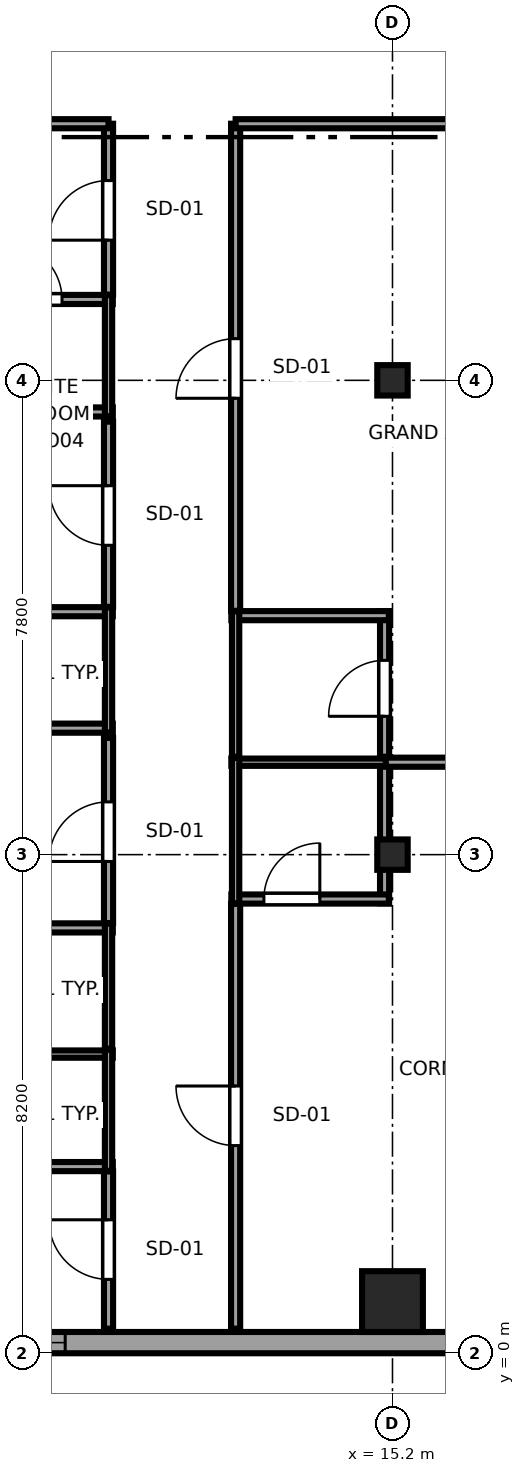
"""IFC4 building model, lengths in metres.
Left out: names, types, materials, properties, quantities, classifications, styles, units other than length and angle.
Written with IfcOpenShell. Run it as: python <this file> out.ifc"""

import sys

from ifc_helpers import new_model, si_unit, direction, frame, frame_2d, origin, origin_2d, place, context, subcontext, project, spatial, rectangle, i_section, extrude, source, transform, mapped, element, fill, save


model = new_model("IFC4")
c1 = context("Model", 3, precision=1e-05, world=origin(), true_north=direction((0.0, 1.0)))
c2 = subcontext(c1, "Body", "Model", "MODEL_VIEW")
j1 = project(units=[si_unit("LENGTHUNIT", "METRE"), si_unit("PLANEANGLEUNIT", "RADIAN")], contexts=[c1])
p1 = place(None, origin())
s1 = spatial("IfcSite", under=j1, at=p1, CompositionType="ELEMENT")
p2 = place(p1, origin())
s2 = spatial("IfcBuilding", under=s1, at=p2, CompositionType="ELEMENT")
p3 = place(p2, frame((0.0, 0.0, 63.95)))
s3 = spatial("IfcBuildingStorey", under=s2, at=p3, CompositionType="ELEMENT", Elevation=63.95)
m1 = source(origin(), c2, "Body", "SweptSolid", [
    extrude(rectangle(XDim=1.0, YDim=1.0, at=origin_2d()), origin(), (0.0, 0.0, 1.0), 3.55),
])
p4 = place(p3, frame((15.2, 0.85, 0.0), z_axis=(0.0, 0.0, 1.0), x_axis=(1.0, 0.0, 0.0)))
e1 = element("IfcColumn", 1, at=p4, inside=s3, PredefinedType="COLUMN", context=c2, shape_type="MappedRepresentation", body=[
    mapped(m1, transform((0.0, 0.0, 0.0), x_axis=(1.0, 0.0, 0.0), y_axis=(0.0, 1.0, 0.0), z_axis=(0.0, 0.0, 1.0), scale=1.0)),
])
m2 = source(origin(), c2, "Body", "SweptSolid", [
    extrude(i_section(OverallWidth=0.5, OverallDepth=0.5, WebThickness=0.028, FlangeThickness=0.045, at=origin_2d()), origin(), (0.0, 0.0, 1.0), 3.55),
])
for number, where, z_axis, x_axis in (
    (2, (15.2, 8.2, 0.0), (0.0, 0.0, 1.0), (1.0, 0.0, 0.0)),
    (3, (15.2, 16.0, 0.0), (0.0, 0.0, 1.0), (1.0, 0.0, 0.0)),
):
    element("IfcColumn", number, at=place(p3, frame(where, z_axis=z_axis, x_axis=x_axis)), inside=s3, PredefinedType="COLUMN", context=c2, shape_type="MappedRepresentation", body=[
        mapped(m2, transform((0.0, 0.0, 0.0), x_axis=(1.0, 0.0, 0.0), y_axis=(0.0, 1.0, 0.0), z_axis=(0.0, 0.0, 1.0), scale=1.0)),
    ])
p5 = place(p3, frame((4.617, 0.175, 0.0), z_axis=(0.0, 0.0, 1.0), x_axis=(1.0, 0.0, 0.0)))
e4 = element("IfcWall", 4, at=p5, inside=s3, PredefinedType="SOLIDWALL", context=c2, shape_type="SweptSolid", body=[
    extrude(rectangle(XDim=18.008, YDim=0.35, at=frame_2d((9.004, 0.0))), origin(), (0.0, 0.0, 1.0), 3.37),
])
p6 = place(p5, frame((14.257, 0.0, 0.68)))
e5 = element("IfcOpeningElement", 5, at=p6, cuts=e4, PredefinedType="OPENING", context=c2, shape_type="SweptSolid", body=[
    extrude(rectangle(XDim=2.1, YDim=1.9, at=frame_2d((1.05, 0.95))), frame((0.0, 0.185, 0.0), z_axis=(0.0, -1.0, 0.0), x_axis=(1.0, 0.0, 0.0)), (0.0, 0.0, 1.0), 0.37),
])
p7 = place(p5, frame((3.7, 0.0, 0.62)))
e6 = element("IfcOpeningElement", 6, at=p7, cuts=e4, PredefinedType="OPENING", context=c2, shape_type="SweptSolid", body=[
    extrude(rectangle(XDim=1.5, YDim=1.55, at=frame_2d((0.75, 0.775))), frame((0.0, 0.185, 0.0), z_axis=(0.0, -1.0, 0.0), x_axis=(1.0, 0.0, 0.0)), (0.0, 0.0, 1.0), 0.37),
])
p8 = place(p3, frame((8.01, 3.07, 0.0), z_axis=(0.0, 0.0, 1.0), x_axis=(1.0, 0.0, 0.0)))
e7 = element("IfcWall", 7, at=p8, inside=s3, PredefinedType="PARTITIONING", context=c2, shape_type="SweptSolid", body=[
    extrude(rectangle(XDim=2.59, YDim=0.15, at=frame_2d((1.295, 0.0))), origin(), (0.0, 0.0, 1.0), 3.37),
])
p9 = place(p3, frame((8.01, 4.92, 0.0), z_axis=(0.0, 0.0, 1.0), x_axis=(1.0, 0.0, 0.0)))
e8 = element("IfcWall", 8, at=p9, inside=s3, PredefinedType="PLUMBINGWALL", context=c2, shape_type="SweptSolid", body=[
    extrude(rectangle(XDim=2.59, YDim=0.12, at=frame_2d((1.295, 0.0))), origin(), (0.0, 0.0, 1.0), 3.37),
])
p10 = place(p3, frame((10.53, 3.0, 0.0), z_axis=(0.0, 0.0, 1.0), x_axis=(0.0, 1.0, 0.0)))
e9 = element("IfcWall", 9, at=p10, inside=s3, PredefinedType="PLUMBINGWALL", context=c2, shape_type="SweptSolid", body=[
    extrude(rectangle(XDim=1.99, YDim=0.12, at=frame_2d((0.995, 0.0))), origin(), (0.0, 0.0, 1.0), 3.37),
])
p11 = place(p3, frame((8.01, 6.995, 0.0), z_axis=(0.0, 0.0, 1.0), x_axis=(1.0, 0.0, 0.0)))
e10 = element("IfcWall", 10, at=p11, inside=s3, PredefinedType="PARTITIONING", context=c2, shape_type="SweptSolid", body=[
    extrude(rectangle(XDim=2.59, YDim=0.15, at=frame_2d((1.295, 0.0))), origin(), (0.0, 0.0, 1.0), 3.37),
])
p12 = place(p3, frame((10.53, 5.01, 0.0), z_axis=(0.0, 0.0, 1.0), x_axis=(0.0, 1.0, 0.0)))
e11 = element("IfcWall", 11, at=p12, inside=s3, PredefinedType="PLUMBINGWALL", context=c2, shape_type="SweptSolid", body=[
    extrude(rectangle(XDim=2.055, YDim=0.12, at=frame_2d((1.027, 0.0))), origin(), (0.0, 0.0, 1.0), 3.37),
])
p13 = place(p3, frame((0.405, 10.28, 0.0), z_axis=(0.0, 0.0, 1.0), x_axis=(1.0, 0.0, 0.0)))
e12 = element("IfcWall", 12, at=p13, inside=s3, PredefinedType="PARTITIONING", context=c2, shape_type="SweptSolid", body=[
    extrude(rectangle(XDim=10.195, YDim=0.15, at=frame_2d((5.098, 0.0))), origin(), (0.0, 0.0, 1.0), 3.37),
])
p14 = place(p3, frame((8.01, 12.195, 0.0), z_axis=(0.0, 0.0, 1.0), x_axis=(1.0, 0.0, 0.0)))
e13 = element("IfcWall", 13, at=p14, inside=s3, PredefinedType="PARTITIONING", context=c2, shape_type="SweptSolid", body=[
    extrude(rectangle(XDim=2.59, YDim=0.15, at=frame_2d((1.295, 0.0))), origin(), (0.0, 0.0, 1.0), 3.37),
])
p15 = place(p3, frame((10.53, 10.21, 0.0), z_axis=(0.0, 0.0, 1.0), x_axis=(0.0, 1.0, 0.0)))
e14 = element("IfcWall", 14, at=p15, inside=s3, PredefinedType="PLUMBINGWALL", context=c2, shape_type="SweptSolid", body=[
    extrude(rectangle(XDim=2.055, YDim=0.12, at=frame_2d((1.027, 0.0))), origin(), (0.0, 0.0, 1.0), 3.37),
])
p16 = place(p3, frame((0.405, 15.48, 0.0), z_axis=(0.0, 0.0, 1.0), x_axis=(1.0, 0.0, 0.0)))
e15 = element("IfcWall", 15, at=p16, inside=s3, PredefinedType="PARTITIONING", context=c2, shape_type="SweptSolid", body=[
    extrude(rectangle(XDim=10.195, YDim=0.15, at=frame_2d((5.098, 0.0))), origin(), (0.0, 0.0, 1.0), 3.37),
])
p17 = place(p3, frame((8.01, 17.33, 0.0), z_axis=(0.0, 0.0, 1.0), x_axis=(1.0, 0.0, 0.0)))
e16 = element("IfcWall", 16, at=p17, inside=s3, PredefinedType="PARTITIONING", context=c2, shape_type="SweptSolid", body=[
    extrude(rectangle(XDim=2.59, YDim=0.15, at=frame_2d((1.295, 0.0))), origin(), (0.0, 0.0, 1.0), 3.37),
])
p18 = place(p17, frame((0.835, 0.0, 0.0)))
e17 = element("IfcOpeningElement", 17, at=p18, cuts=e16, PredefinedType="OPENING", context=c2, shape_type="SweptSolid", body=[
    extrude(rectangle(XDim=0.92, YDim=2.01, at=frame_2d((0.46, 1.005))), frame((0.0, 0.085, 0.0), z_axis=(0.0, -1.0, 0.0), x_axis=(1.0, 0.0, 0.0)), (0.0, 0.0, 1.0), 0.17),
])
p19 = place(p3, frame((10.53, 15.41, 0.0), z_axis=(0.0, 0.0, 1.0), x_axis=(0.0, 1.0, 0.0)))
e18 = element("IfcWall", 18, at=p19, inside=s3, PredefinedType="PLUMBINGWALL", context=c2, shape_type="SweptSolid", body=[
    extrude(rectangle(XDim=1.99, YDim=0.12, at=frame_2d((0.995, 0.0))), origin(), (0.0, 0.0, 1.0), 3.37),
])
p20 = place(p3, frame((15.07, 7.4, 0.0), z_axis=(0.0, 0.0, 1.0), x_axis=(0.0, 1.0, 0.0)))
e19 = element("IfcWall", 19, at=p20, inside=s3, PredefinedType="PARTITIONING", context=c2, shape_type="SweptSolid", body=[
    extrude(rectangle(XDim=2.39, YDim=0.15, at=frame_2d((1.195, 0.0))), origin(), (0.0, 0.0, 1.0), 2.827),
])
p21 = place(p3, frame((12.55, 7.47, 0.0), z_axis=(0.0, 0.0, 1.0), x_axis=(1.0, 0.0, 0.0)))
e20 = element("IfcWall", 20, at=p21, inside=s3, PredefinedType="PARTITIONING", context=c2, shape_type="SweptSolid", body=[
    extrude(rectangle(XDim=2.59, YDim=0.15, at=frame_2d((1.295, 0.0))), origin(), (0.0, 0.0, 1.0), 3.37),
])
p22 = place(p21, frame((0.535, 0.0, 0.0)))
e21 = element("IfcOpeningElement", 21, at=p22, cuts=e20, PredefinedType="OPENING", context=c2, shape_type="SweptSolid", body=[
    extrude(rectangle(XDim=0.92, YDim=2.01, at=frame_2d((0.46, 1.005))), frame((0.0, 0.085, 0.0), z_axis=(0.0, -1.0, 0.0), x_axis=(1.0, 0.0, 0.0)), (0.0, 0.0, 1.0), 0.17),
])
p23 = place(p3, frame((12.55, 9.72, 0.0), z_axis=(0.0, 0.0, 1.0), x_axis=(1.0, 0.0, 0.0)))
e22 = element("IfcWall", 22, at=p23, inside=s3, PredefinedType="PLUMBINGWALL", context=c2, shape_type="SweptSolid", body=[
    extrude(rectangle(XDim=2.59, YDim=0.12, at=frame_2d((1.295, 0.0))), origin(), (0.0, 0.0, 1.0), 3.37),
])
p24 = place(p3, frame((12.62, 7.4, 0.0), z_axis=(0.0, 0.0, 1.0), x_axis=(0.0, 1.0, 0.0)))
e23 = element("IfcWall", 23, at=p24, inside=s3, PredefinedType="PLUMBINGWALL", context=c2, shape_type="SweptSolid", body=[
    extrude(rectangle(XDim=2.39, YDim=0.12, at=frame_2d((1.195, 0.0))), origin(), (0.0, 0.0, 1.0), 3.37),
])
p25 = place(p3, frame((15.07, 9.81, 0.0), z_axis=(0.0, 0.0, 1.0), x_axis=(0.0, 1.0, 0.0)))
e24 = element("IfcWall", 24, at=p25, inside=s3, PredefinedType="PARTITIONING", context=c2, shape_type="SweptSolid", body=[
    extrude(rectangle(XDim=2.39, YDim=0.15, at=frame_2d((1.195, 0.0))), origin(), (0.0, 0.0, 1.0), 2.827),
])
p26 = place(p25, frame((0.665, 0.0, 0.0)))
e25 = element("IfcOpeningElement", 25, at=p26, cuts=e24, PredefinedType="OPENING", context=c2, shape_type="SweptSolid", body=[
    extrude(rectangle(XDim=0.92, YDim=2.01, at=frame_2d((0.46, 1.005))), frame((0.0, 0.085, 0.0), z_axis=(0.0, -1.0, 0.0), x_axis=(1.0, 0.0, 0.0)), (0.0, 0.0, 1.0), 0.17),
])
p27 = place(p3, frame((12.55, 12.13, 0.0), z_axis=(0.0, 0.0, 1.0), x_axis=(1.0, 0.0, 0.0)))
e26 = element("IfcWall", 26, at=p27, inside=s3, PredefinedType="PARTITIONING", context=c2, shape_type="SweptSolid", body=[
    extrude(rectangle(XDim=2.59, YDim=0.15, at=frame_2d((1.295, 0.0))), origin(), (0.0, 0.0, 1.0), 3.37),
])
p28 = place(p3, frame((12.62, 9.81, 0.0), z_axis=(0.0, 0.0, 1.0), x_axis=(0.0, 1.0, 0.0)))
e27 = element("IfcWall", 27, at=p28, inside=s3, PredefinedType="PLUMBINGWALL", context=c2, shape_type="SweptSolid", body=[
    extrude(rectangle(XDim=2.39, YDim=0.12, at=frame_2d((1.195, 0.0))), origin(), (0.0, 0.0, 1.0), 3.37),
])
p29 = place(p3, frame((10.53, 0.405, 0.0), z_axis=(0.0, 0.0, 1.0), x_axis=(0.0, 1.0, 0.0)))
e28 = element("IfcWall", 28, at=p29, inside=s3, PredefinedType="PARTITIONING", context=c2, shape_type="SweptSolid", body=[
    extrude(rectangle(XDim=2.585, YDim=0.15, at=frame_2d((1.292, 0.0))), origin(), (0.0, 0.0, 1.0), 3.37),
])
p30 = place(p29, frame((0.81, 0.0, 0.0)))
e29 = element("IfcOpeningElement", 29, at=p30, cuts=e28, PredefinedType="OPENING", context=c2, shape_type="SweptSolid", body=[
    extrude(rectangle(XDim=0.98, YDim=2.12, at=frame_2d((0.49, 1.06))), frame((0.0, 0.085, 0.0), z_axis=(0.0, -1.0, 0.0), x_axis=(1.0, 0.0, 0.0)), (0.0, 0.0, 1.0), 0.17),
])
p31 = place(p3, frame((10.53, 7.075, 0.0), z_axis=(0.0, 0.0, 1.0), x_axis=(0.0, 1.0, 0.0)))
e30 = element("IfcWall", 30, at=p31, inside=s3, PredefinedType="PARTITIONING", context=c2, shape_type="SweptSolid", body=[
    extrude(rectangle(XDim=3.045, YDim=0.15, at=frame_2d((1.522, 0.0))), origin(), (0.0, 0.0, 1.0), 3.37),
])
p32 = place(p31, frame((1.012, 0.0, 0.0)))
e31 = element("IfcOpeningElement", 31, at=p32, cuts=e30, PredefinedType="OPENING", context=c2, shape_type="SweptSolid", body=[
    extrude(rectangle(XDim=0.98, YDim=2.12, at=frame_2d((0.49, 1.06))), frame((0.0, 0.085, 0.0), z_axis=(0.0, -1.0, 0.0), x_axis=(1.0, 0.0, 0.0)), (0.0, 0.0, 1.0), 0.17),
])
p33 = place(p3, frame((10.53, 12.275, 0.0), z_axis=(0.0, 0.0, 1.0), x_axis=(0.0, 1.0, 0.0)))
e32 = element("IfcWall", 32, at=p33, inside=s3, PredefinedType="PARTITIONING", context=c2, shape_type="SweptSolid", body=[
    extrude(rectangle(XDim=3.045, YDim=0.15, at=frame_2d((1.522, 0.0))), origin(), (0.0, 0.0, 1.0), 3.37),
])
p34 = place(p33, frame((1.012, 0.0, 0.0)))
e33 = element("IfcOpeningElement", 33, at=p34, cuts=e32, PredefinedType="OPENING", context=c2, shape_type="SweptSolid", body=[
    extrude(rectangle(XDim=0.98, YDim=2.12, at=frame_2d((0.49, 1.06))), frame((0.0, 0.085, 0.0), z_axis=(0.0, -1.0, 0.0), x_axis=(1.0, 0.0, 0.0)), (0.0, 0.0, 1.0), 0.17),
])
p35 = place(p3, frame((10.53, 17.41, 0.0), z_axis=(0.0, 0.0, 1.0), x_axis=(0.0, 1.0, 0.0)))
e34 = element("IfcWall", 34, at=p35, inside=s3, PredefinedType="PARTITIONING", context=c2, shape_type="SweptSolid", body=[
    extrude(rectangle(XDim=2.81, YDim=0.15, at=frame_2d((1.405, 0.0))), origin(), (0.0, 0.0, 1.0), 3.37),
])
p36 = place(p35, frame((0.895, 0.0, 0.0)))
e35 = element("IfcOpeningElement", 35, at=p36, cuts=e34, PredefinedType="OPENING", context=c2, shape_type="SweptSolid", body=[
    extrude(rectangle(XDim=0.98, YDim=2.12, at=frame_2d((0.49, 1.06))), frame((0.0, 0.085, 0.0), z_axis=(0.0, -1.0, 0.0), x_axis=(1.0, 0.0, 0.0)), (0.0, 0.0, 1.0), 0.17),
])
p37 = place(p3, frame((0.405, 20.22, 0.0), z_axis=(0.0, 0.0, 1.0), x_axis=(1.0, 0.0, 0.0)))
e36 = element("IfcWall", 36, at=p37, inside=s3, PredefinedType="PARTITIONING", context=c2, shape_type="SweptSolid", body=[
    extrude(rectangle(XDim=10.125, YDim=0.15, at=frame_2d((5.062, 0.0))), origin(), (0.0, 0.0, 1.0), 3.37),
])
p38 = place(p3, frame((12.62, 0.405, 0.0), z_axis=(0.0, 0.0, 1.0), x_axis=(0.0, 1.0, 0.0)))
e37 = element("IfcWall", 37, at=p38, inside=s3, PredefinedType="PARTITIONING", context=c2, shape_type="SweptSolid", body=[
    extrude(rectangle(XDim=6.985, YDim=0.15, at=frame_2d((3.492, 0.0))), origin(), (0.0, 0.0, 1.0), 3.37),
])
p39 = place(p38, frame((3.01, 0.0, 0.0)))
e38 = element("IfcOpeningElement", 38, at=p39, cuts=e37, PredefinedType="OPENING", context=c2, shape_type="SweptSolid", body=[
    extrude(rectangle(XDim=0.98, YDim=2.12, at=frame_2d((0.49, 1.06))), frame((0.0, 0.085, 0.0), z_axis=(0.0, -1.0, 0.0), x_axis=(1.0, 0.0, 0.0)), (0.0, 0.0, 1.0), 0.17),
])
p40 = place(p3, frame((15.09, 9.72, 0.0), z_axis=(0.0, 0.0, 1.0), x_axis=(1.0, 0.0, 0.0)))
e39 = element("IfcWall", 39, at=p40, inside=s3, PredefinedType="PARTITIONING", context=c2, shape_type="SweptSolid", body=[
    extrude(rectangle(XDim=7.26, YDim=0.15, at=frame_2d((3.63, 0.0))), origin(), (0.0, 0.0, 1.0), 3.37),
])
p41 = place(p3, frame((12.62, 12.21, 0.0), z_axis=(0.0, 0.0, 1.0), x_axis=(0.0, 1.0, 0.0)))
e40 = element("IfcWall", 40, at=p41, inside=s3, PredefinedType="PARTITIONING", context=c2, shape_type="SweptSolid", body=[
    extrude(rectangle(XDim=8.01, YDim=0.15, at=frame_2d((4.005, 0.0))), origin(), (0.0, 0.0, 1.0), 3.37),
])
p42 = place(p41, frame((3.495, 0.0, 0.0)))
e41 = element("IfcOpeningElement", 41, at=p42, cuts=e40, PredefinedType="OPENING", context=c2, shape_type="SweptSolid", body=[
    extrude(rectangle(XDim=0.98, YDim=2.12, at=frame_2d((0.49, 1.06))), frame((0.0, 0.085, 0.0), z_axis=(0.0, -1.0, 0.0), x_axis=(1.0, 0.0, 0.0)), (0.0, 0.0, 1.0), 0.17),
])
p43 = place(p3, frame((12.62, 20.22, 0.0), z_axis=(0.0, 0.0, 1.0), x_axis=(1.0, 0.0, 0.0)))
e42 = element("IfcWall", 42, at=p43, inside=s3, PredefinedType="PARTITIONING", context=c2, shape_type="SweptSolid", body=[
    extrude(rectangle(XDim=9.73, YDim=0.15, at=frame_2d((4.865, 0.0))), origin(), (0.0, 0.0, 1.0), 2.954),
])
m3 = source(origin(), c2, "Body", "SweptSolid", [
    extrude(rectangle(XDim=1.5, YDim=1.55, at=frame_2d((0.75, 0.775))), frame((0.0, 0.09, 0.0), z_axis=(0.0, -1.0, 0.0), x_axis=(1.0, 0.0, 0.0)), (0.0, 0.0, 1.0), 0.06),
])
p44 = place(p7, origin())
e43 = element("IfcWindow", 43, at=p44, inside=s3, PartitioningType="SINGLE_PANEL", PredefinedType="WINDOW", context=c2, shape_type="MappedRepresentation", body=[
    mapped(m3, transform((0.0, 0.0, 0.0), x_axis=(1.0, 0.0, 0.0), y_axis=(0.0, 1.0, 0.0), z_axis=(0.0, 0.0, 1.0), scale=1.0)),
])
fill(e6, e43)
m4 = source(origin(), c2, "Body", "SweptSolid", [
    extrude(rectangle(XDim=0.92, YDim=2.01, at=frame_2d((0.46, 1.005))), frame((0.0, 0.025, 0.0), z_axis=(0.0, -1.0, 0.0), x_axis=(1.0, 0.0, 0.0)), (0.0, 0.0, 1.0), 0.05),
])
p45 = place(p18, origin())
e44 = element("IfcDoor", 44, at=p45, inside=s3, OperationType="SINGLE_SWING_LEFT", PredefinedType="DOOR", context=c2, shape_type="MappedRepresentation", body=[
    mapped(m4, transform((0.0, 0.0, 0.0), x_axis=(1.0, 0.0, 0.0), y_axis=(0.0, 1.0, 0.0), z_axis=(0.0, 0.0, 1.0), scale=1.0)),
])
fill(e17, e44)
p46 = place(p22, origin())
e45 = element("IfcDoor", 45, at=p46, inside=s3, OperationType="SINGLE_SWING_RIGHT", PredefinedType="DOOR", context=c2, shape_type="MappedRepresentation", body=[
    mapped(m4, transform((0.0, 0.0, 0.0), x_axis=(1.0, 0.0, 0.0), y_axis=(0.0, 1.0, 0.0), z_axis=(0.0, 0.0, 1.0), scale=1.0)),
])
fill(e21, e45)
p47 = place(p26, origin())
e46 = element("IfcDoor", 46, at=p47, inside=s3, OperationType="SINGLE_SWING_LEFT", PredefinedType="DOOR", context=c2, shape_type="MappedRepresentation", body=[
    mapped(m4, transform((0.0, 0.0, 0.0), x_axis=(1.0, 0.0, 0.0), y_axis=(0.0, 1.0, 0.0), z_axis=(0.0, 0.0, 1.0), scale=1.0)),
])
fill(e25, e46)
m5 = source(origin(), c2, "Body", "SweptSolid", [
    extrude(rectangle(XDim=0.98, YDim=2.12, at=frame_2d((0.49, 1.06))), frame((0.0, 0.025, 0.0), z_axis=(0.0, -1.0, 0.0), x_axis=(1.0, 0.0, 0.0)), (0.0, 0.0, 1.0), 0.05),
])
p48 = place(p30, origin())
e47 = element("IfcDoor", 47, at=p48, inside=s3, OperationType="SINGLE_SWING_RIGHT", PredefinedType="DOOR", context=c2, shape_type="MappedRepresentation", body=[
    mapped(m5, transform((0.0, 0.0, 0.0), x_axis=(1.0, 0.0, 0.0), y_axis=(0.0, 1.0, 0.0), z_axis=(0.0, 0.0, 1.0), scale=1.0)),
])
fill(e29, e47)
p49 = place(p32, origin())
e48 = element("IfcDoor", 48, at=p49, inside=s3, OperationType="SINGLE_SWING_LEFT", PredefinedType="DOOR", context=c2, shape_type="MappedRepresentation", body=[
    mapped(m5, transform((0.0, 0.0, 0.0), x_axis=(1.0, 0.0, 0.0), y_axis=(0.0, 1.0, 0.0), z_axis=(0.0, 0.0, 1.0), scale=1.0)),
])
fill(e31, e48)
p50 = place(p34, origin())
e49 = element("IfcDoor", 49, at=p50, inside=s3, OperationType="SINGLE_SWING_RIGHT", PredefinedType="DOOR", context=c2, shape_type="MappedRepresentation", body=[
    mapped(m5, transform((0.0, 0.0, 0.0), x_axis=(1.0, 0.0, 0.0), y_axis=(0.0, 1.0, 0.0), z_axis=(0.0, 0.0, 1.0), scale=1.0)),
])
fill(e33, e49)
p51 = place(p36, origin())
e50 = element("IfcDoor", 50, at=p51, inside=s3, OperationType="SINGLE_SWING_LEFT", PredefinedType="DOOR", context=c2, shape_type="MappedRepresentation", body=[
    mapped(m5, transform((0.0, 0.0, 0.0), x_axis=(1.0, 0.0, 0.0), y_axis=(0.0, 1.0, 0.0), z_axis=(0.0, 0.0, 1.0), scale=1.0)),
])
fill(e35, e50)
p52 = place(p39, origin())
e51 = element("IfcDoor", 51, at=p52, inside=s3, OperationType="SINGLE_SWING_RIGHT", PredefinedType="DOOR", context=c2, shape_type="MappedRepresentation", body=[
    mapped(m5, transform((0.0, 0.0, 0.0), x_axis=(1.0, 0.0, 0.0), y_axis=(0.0, 1.0, 0.0), z_axis=(0.0, 0.0, 1.0), scale=1.0)),
])
fill(e38, e51)
p53 = place(p42, origin())
e52 = element("IfcDoor", 52, at=p53, inside=s3, OperationType="SINGLE_SWING_LEFT", PredefinedType="DOOR", context=c2, shape_type="MappedRepresentation", body=[
    mapped(m5, transform((0.0, 0.0, 0.0), x_axis=(1.0, 0.0, 0.0), y_axis=(0.0, 1.0, 0.0), z_axis=(0.0, 0.0, 1.0), scale=1.0)),
])
fill(e41, e52)
save(model, sys.argv[1])
